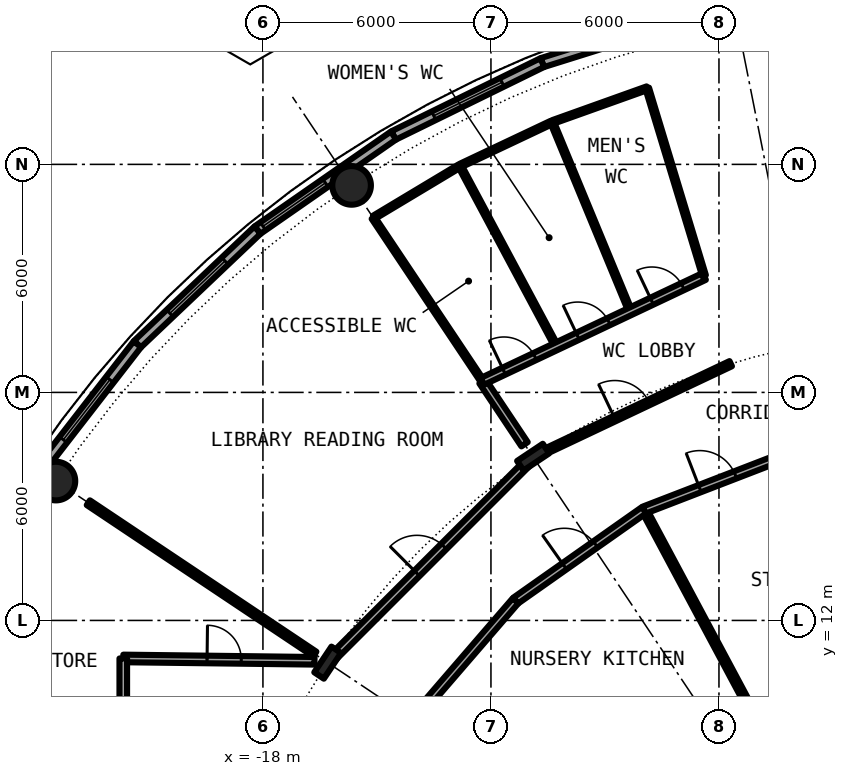
"""IFC4 building model, lengths in metres.
Left out: names, types, materials, properties, quantities, classifications, styles, units other than length and angle.
Written with IfcOpenShell. Run it as: python <this file> out.ifc"""

import sys

from ifc_helpers import new_model, si_unit, direction, frame, frame_2d, origin, origin_2d, place, context, subcontext, project, spatial, rectangle, hollow_circle, i_section, extrude, element, fill, save


model = new_model("IFC4")
c1 = context("Model", 3, precision=1e-05, world=origin(), true_north=direction((0.0, 1.0)))
c2 = subcontext(c1, "Body", "Model", "MODEL_VIEW")
j1 = project(units=[si_unit("LENGTHUNIT", "METRE"), si_unit("PLANEANGLEUNIT", "RADIAN")], contexts=[c1])
p1 = place(None, origin())
s1 = spatial("IfcSite", under=j1, at=p1, CompositionType="ELEMENT")
p2 = place(p1, origin())
s2 = spatial("IfcBuilding", under=s1, at=p2, CompositionType="ELEMENT")
p3 = place(p2, frame((0.0, 0.0, 14.1)))
s3 = spatial("IfcBuildingStorey", under=s2, at=p3, CompositionType="ELEMENT", Elevation=14.1)
for number, where, z_axis, x_axis in (
    (1, (-15.667, 23.448, 0.0), (0.0, 0.0, 1.0), (1.0, 0.0, 0.0)),
    (2, (-23.448, 15.667, 0.0), (0.0, 0.0, 1.0), (1.0, 0.0, 0.0)),
):
    element("IfcColumn", number, at=place(p3, frame(where, z_axis=z_axis, x_axis=x_axis)), inside=s3, PredefinedType="COLUMN", context=c2, shape_type="SweptSolid", body=[
        extrude(hollow_circle(Radius=0.508, WallThickness=0.05, at=origin_2d()), origin(), (0.0, 0.0, 1.0), 4.2),
    ])
for number, where, z_axis, x_axis in (
    (3, (-10.889, 16.297, 0.0), (0.0, 0.0, 1.0), (-0.556, 0.831, 0.0)),
    (4, (-16.297, 10.889, 0.0), (0.0, 0.0, 1.0), (-0.831, 0.556, 0.0)),
):
    element("IfcColumn", number, at=place(p3, frame(where, z_axis=z_axis, x_axis=x_axis)), inside=s3, PredefinedType="COLUMN", context=c2, shape_type="SweptSolid", body=[
        extrude(i_section(OverallWidth=0.303, OverallDepth=0.814, WebThickness=0.021, FlangeThickness=0.04, FilletRadius=0.03, at=origin_2d()), origin(), (0.0, 0.0, 1.0), 4.2),
    ])
p4 = place(p3, frame((-6.489, 27.982, 0.0), z_axis=(0.0, 0.0, 1.0), x_axis=(-0.954219534331, -0.299107138498, 0.0)))
e5 = element("IfcWall", 5, at=p4, inside=s3, PredefinedType="SOLIDWALL", context=c2, shape_type="SweptSolid", body=[
    extrude(rectangle(XDim=4.359, YDim=0.25, at=frame_2d((2.18, 0.0))), origin(), (0.0, 0.0, 1.0), 3.8),
])
p5 = place(p4, frame((1.18, 0.0, 0.9)))
e6 = element("IfcOpeningElement", 6, at=p5, cuts=e5, PredefinedType="OPENING", context=c2, shape_type="SweptSolid", body=[
    extrude(rectangle(XDim=2.0, YDim=2.4, at=frame_2d((1.0, 1.2))), frame((0.0, 0.135, 0.0), z_axis=(0.0, -1.0, 0.0), x_axis=(1.0, 0.0, 0.0)), (0.0, 0.0, 1.0), 0.27),
])
p6 = place(p3, frame((-10.649, 26.678, 0.0), z_axis=(0.0, 0.0, 1.0), x_axis=(-0.897938079481, -0.440121807478, 0.0)))
e7 = element("IfcWall", 7, at=p6, inside=s3, PredefinedType="SOLIDWALL", context=c2, shape_type="SweptSolid", body=[
    extrude(rectangle(XDim=4.36, YDim=0.25, at=frame_2d((2.18, 0.0))), origin(), (0.0, 0.0, 1.0), 3.8),
])
p7 = place(p6, frame((1.18, 0.0, 0.9)))
e8 = element("IfcOpeningElement", 8, at=p7, cuts=e7, PredefinedType="OPENING", context=c2, shape_type="SweptSolid", body=[
    extrude(rectangle(XDim=2.0, YDim=2.4, at=frame_2d((1.0, 1.2))), frame((0.0, 0.135, 0.0), z_axis=(0.0, -1.0, 0.0), x_axis=(1.0, 0.0, 0.0)), (0.0, 0.0, 1.0), 0.27),
])
p8 = place(p3, frame((-14.564, 24.759, 0.0), z_axis=(0.0, 0.0, 1.0), x_axis=(-0.820990800869, -0.57094141984, 0.0)))
e9 = element("IfcWall", 9, at=p8, inside=s3, PredefinedType="SOLIDWALL", context=c2, shape_type="SweptSolid", body=[
    extrude(rectangle(XDim=4.359, YDim=0.25, at=frame_2d((2.18, 0.0))), origin(), (0.0, 0.0, 1.0), 3.8),
])
p9 = place(p8, frame((2.183, 0.0, 0.9)))
e10 = element("IfcOpeningElement", 10, at=p9, cuts=e9, PredefinedType="OPENING", context=c2, shape_type="SweptSolid", body=[
    extrude(rectangle(XDim=2.0, YDim=2.4, at=frame_2d((1.0, 1.2))), frame((0.0, 0.135, 0.0), z_axis=(0.0, -1.0, 0.0), x_axis=(1.0, 0.0, 0.0)), (0.0, 0.0, 1.0), 0.27),
])
p10 = place(p3, frame((-18.143, 22.27, 0.0), z_axis=(0.0, 0.0, 1.0), x_axis=(-0.725101501119, -0.68864200647, 0.0)))
e11 = element("IfcWall", 11, at=p10, inside=s3, PredefinedType="SOLIDWALL", context=c2, shape_type="SweptSolid", body=[
    extrude(rectangle(XDim=4.359, YDim=0.25, at=frame_2d((2.18, 0.0))), origin(), (0.0, 0.0, 1.0), 3.8),
])
p11 = place(p10, frame((1.18, 0.0, 0.9)))
e12 = element("IfcOpeningElement", 12, at=p11, cuts=e11, PredefinedType="OPENING", context=c2, shape_type="SweptSolid", body=[
    extrude(rectangle(XDim=2.0, YDim=2.4, at=frame_2d((1.0, 1.2))), frame((0.0, 0.135, 0.0), z_axis=(0.0, -1.0, 0.0), x_axis=(1.0, 0.0, 0.0)), (0.0, 0.0, 1.0), 0.27),
])
p12 = place(p3, frame((-21.304, 19.268, 0.0), z_axis=(0.0, 0.0, 1.0), x_axis=(-0.612637256412, -0.790364214812, 0.0)))
e13 = element("IfcWall", 13, at=p12, inside=s3, PredefinedType="SOLIDWALL", context=c2, shape_type="SweptSolid", body=[
    extrude(rectangle(XDim=4.36, YDim=0.25, at=frame_2d((2.18, 0.0))), origin(), (0.0, 0.0, 1.0), 3.8),
])
p13 = place(p12, frame((1.18, 0.0, 0.9)))
e14 = element("IfcOpeningElement", 14, at=p13, cuts=e13, PredefinedType="OPENING", context=c2, shape_type="SweptSolid", body=[
    extrude(rectangle(XDim=2.0, YDim=2.4, at=frame_2d((1.0, 1.2))), frame((0.0, 0.135, 0.0), z_axis=(0.0, -1.0, 0.0), x_axis=(1.0, 0.0, 0.0)), (0.0, 0.0, 1.0), 0.27),
])
p14 = place(p3, frame((-22.595, 15.098, 0.0), z_axis=(0.0, 0.0, 1.0), x_axis=(0.831431488123, -0.555627285648, 0.0)))
e15 = element("IfcWall", 15, at=p14, inside=s3, PredefinedType="PARTITIONING", context=c2, shape_type="SweptSolid", body=[
    extrude(rectangle(XDim=7.168, YDim=0.15, at=frame_2d((3.584, 0.0))), origin(), (0.0, 0.0, 1.0), 3.8),
])
p15 = place(p3, frame((-15.098, 22.595, 0.0), z_axis=(0.0, 0.0, 1.0), x_axis=(0.555549082229, -0.83148374442, 0.0)))
e16 = element("IfcWall", 16, at=p15, inside=s3, PredefinedType="PARTITIONING", context=c2, shape_type="SweptSolid", body=[
    extrude(rectangle(XDim=5.175, YDim=0.1, at=frame_2d((2.587, 0.0))), origin(), (0.0, 0.0, 1.0), 3.8),
])
p16 = place(p3, frame((-12.819, 23.962, 0.0), z_axis=(0.0, 0.0, 1.0), x_axis=(0.471698142177, -0.881760093601, 0.0)))
e17 = element("IfcWall", 17, at=p16, inside=s3, PredefinedType="PARTITIONING", context=c2, shape_type="SweptSolid", body=[
    extrude(rectangle(XDim=5.387, YDim=0.1, at=frame_2d((2.693, 0.0))), origin(), (0.0, 0.0, 1.0), 3.8),
])
p17 = place(p3, frame((-12.222, 18.292, 0.0), z_axis=(0.0, 0.0, 1.0), x_axis=(0.555491592772, -0.831522152657, 0.0)))
e18 = element("IfcWall", 18, at=p17, inside=s3, PredefinedType="PARTITIONING", context=c2, shape_type="SweptSolid", body=[
    extrude(rectangle(XDim=1.993, YDim=0.2, at=frame_2d((0.996, 0.0))), origin(), (0.0, 0.0, 1.0), 3.8),
])
p18 = place(p3, frame((-10.391, 25.11, 0.0), z_axis=(0.0, 0.0, 1.0), x_axis=(0.38229040446, -0.924042232075, 0.0)))
e19 = element("IfcWall", 19, at=p18, inside=s3, PredefinedType="PARTITIONING", context=c2, shape_type="SweptSolid", body=[
    extrude(rectangle(XDim=5.386, YDim=0.1, at=frame_2d((2.693, 0.0))), origin(), (0.0, 0.0, 1.0), 3.8),
])
p19 = place(p3, frame((-7.968, 14.904, 0.0), z_axis=(0.0, 0.0, 1.0), x_axis=(0.471460365694, -0.881887251059, 0.0)))
e20 = element("IfcWall", 20, at=p19, inside=s3, PredefinedType="PARTITIONING", context=c2, shape_type="SweptSolid", body=[
    extrude(rectangle(XDim=9.18, YDim=0.15, at=frame_2d((4.59, 0.0))), origin(), (0.0, 0.0, 1.0), 3.8),
])
p20 = place(p3, frame((-21.675, 11.0, 0.0), z_axis=(0.0, 0.0, 1.0), x_axis=(0.999924074118, -0.012322580895, 0.0)))
e21 = element("IfcWall", 21, at=p20, inside=s3, PredefinedType="PARTITIONING", context=c2, shape_type="SweptSolid", body=[
    extrude(rectangle(XDim=5.032, YDim=0.2, at=frame_2d((2.516, 0.0))), origin(), (0.0, 0.0, 1.0), 3.8),
])
p21 = place(p20, frame((2.205, 0.0, 0.0)))
e22 = element("IfcOpeningElement", 22, at=p21, cuts=e21, PredefinedType="OPENING", context=c2, shape_type="SweptSolid", body=[
    extrude(rectangle(XDim=0.9, YDim=2.3, at=frame_2d((0.45, 1.15))), frame((0.0, 0.11, 0.0), z_axis=(0.0, -1.0, 0.0), x_axis=(1.0, 0.0, 0.0)), (0.0, 0.0, 1.0), 0.22),
])
p22 = place(p3, frame((-14.043, 9.4, 0.0), z_axis=(0.0, 0.0, 1.0), x_axis=(0.653274518104, 0.757121129012, 0.0)))
e23 = element("IfcWall", 23, at=p22, inside=s3, PredefinedType="PARTITIONING", context=c2, shape_type="SweptSolid", body=[
    extrude(rectangle(XDim=4.124, YDim=0.2, at=frame_2d((2.062, 0.0))), origin(), (0.0, 0.0, 1.0), 3.8),
])
p23 = place(p3, frame((-11.349, 12.522, 0.0), z_axis=(0.0, 0.0, 1.0), x_axis=(0.817567680547, 0.575832517079, 0.0)))
e24 = element("IfcWall", 24, at=p23, inside=s3, PredefinedType="PARTITIONING", context=c2, shape_type="SweptSolid", body=[
    extrude(rectangle(XDim=4.137, YDim=0.2, at=frame_2d((2.068, 0.0))), origin(), (0.0, 0.0, 1.0), 3.8),
])
p24 = place(p23, frame((1.568, 0.0, 0.0)))
e25 = element("IfcOpeningElement", 25, at=p24, cuts=e24, PredefinedType="OPENING", context=c2, shape_type="SweptSolid", body=[
    extrude(rectangle(XDim=1.0, YDim=2.3, at=frame_2d((0.5, 1.15))), frame((0.0, 0.11, 0.0), z_axis=(0.0, -1.0, 0.0), x_axis=(1.0, 0.0, 0.0)), (0.0, 0.0, 1.0), 0.22),
])
p25 = place(p3, frame((-7.967, 14.904, 0.0), z_axis=(0.0, 0.0, 1.0), x_axis=(0.932943640288, 0.360022449363, 0.0)))
e26 = element("IfcWall", 26, at=p25, inside=s3, PredefinedType="PARTITIONING", context=c2, shape_type="SweptSolid", body=[
    extrude(rectangle(XDim=4.139, YDim=0.2, at=frame_2d((2.069, 0.0))), origin(), (0.0, 0.0, 1.0), 3.8),
])
p26 = place(p25, frame((1.569, 0.0, 0.0)))
e27 = element("IfcOpeningElement", 27, at=p26, cuts=e26, PredefinedType="OPENING", context=c2, shape_type="SweptSolid", body=[
    extrude(rectangle(XDim=1.0, YDim=2.3, at=frame_2d((0.5, 1.15))), frame((0.0, 0.11, 0.0), z_axis=(0.0, -1.0, 0.0), x_axis=(1.0, 0.0, 0.0)), (0.0, 0.0, 1.0), 0.22),
])
p27 = place(p3, frame((-16.188, 10.998, 0.0), z_axis=(0.0, 0.0, 1.0), x_axis=(0.707106781187, 0.707106781187, 0.0)))
e28 = element("IfcWall", 28, at=p27, inside=s3, PredefinedType="PARTITIONING", context=c2, shape_type="SweptSolid", body=[
    extrude(rectangle(XDim=7.34, YDim=0.2, at=frame_2d((3.67, 0.0))), origin(), (0.0, 0.0, 1.0), 3.38),
])
p28 = place(p27, frame((3.17, 0.0, 0.0)))
e29 = element("IfcOpeningElement", 29, at=p28, cuts=e28, PredefinedType="OPENING", context=c2, shape_type="SweptSolid", body=[
    extrude(rectangle(XDim=1.0, YDim=2.3, at=frame_2d((0.5, 1.15))), frame((0.0, 0.11, 0.0), z_axis=(0.0, -1.0, 0.0), x_axis=(1.0, 0.0, 0.0)), (0.0, 0.0, 1.0), 0.22),
])
p29 = place(p3, frame((-10.751, 16.362, 0.0), z_axis=(0.0, 0.0, 1.0), x_axis=(0.903965018344, 0.42760641437, 0.0)))
e30 = element("IfcWall", 30, at=p29, inside=s3, PredefinedType="PARTITIONING", context=c2, shape_type="SweptSolid", body=[
    extrude(rectangle(XDim=5.599, YDim=0.15, at=frame_2d((2.799, 0.0))), origin(), (0.0, 0.0, 1.0), 3.38),
])
p30 = place(p29, frame((2.223, 0.0, 0.0)))
e31 = element("IfcOpeningElement", 31, at=p30, cuts=e30, PredefinedType="OPENING", context=c2, shape_type="SweptSolid", body=[
    extrude(rectangle(XDim=1.0, YDim=2.3, at=frame_2d((0.5, 1.15))), frame((0.0, 0.085, 0.0), z_axis=(0.0, -1.0, 0.0), x_axis=(1.0, 0.0, 0.0)), (0.0, 0.0, 1.0), 0.17),
])
p31 = place(p3, frame((-21.675, 9.4, 0.0), z_axis=(0.0, 0.0, 1.0), x_axis=(0.0, 1.0, 0.0)))
e32 = element("IfcWall", 32, at=p31, inside=s3, PredefinedType="PARTITIONING", context=c2, shape_type="SweptSolid", body=[
    extrude(rectangle(XDim=1.6, YDim=0.2, at=frame_2d((0.8, 0.0))), origin(), (0.0, 0.0, 1.0), 3.8),
])
p32 = place(p3, frame((-12.226, 18.29, 0.0), z_axis=(0.0, 0.0, 1.0), x_axis=(0.90397320193, 0.427589113745, 0.0)))
e33 = element("IfcWall", 33, at=p32, inside=s3, PredefinedType="PARTITIONING", context=c2, shape_type="SweptSolid", body=[
    extrude(rectangle(XDim=6.459, YDim=0.2, at=frame_2d((3.23, 0.0))), origin(), (0.0, 0.0, 1.0), 3.8),
])
p33 = place(p32, frame((4.934, 0.0, 0.0)))
e34 = element("IfcOpeningElement", 34, at=p33, cuts=e33, PredefinedType="OPENING", context=c2, shape_type="SweptSolid", body=[
    extrude(rectangle(XDim=0.9, YDim=2.3, at=frame_2d((0.45, 1.15))), frame((0.0, 0.11, 0.0), z_axis=(0.0, -1.0, 0.0), x_axis=(1.0, 0.0, 0.0)), (0.0, 0.0, 1.0), 0.22),
])
p34 = place(p32, frame((2.777, 0.0, 0.0)))
e35 = element("IfcOpeningElement", 35, at=p34, cuts=e33, PredefinedType="OPENING", context=c2, shape_type="SweptSolid", body=[
    extrude(rectangle(XDim=0.9, YDim=2.3, at=frame_2d((0.45, 1.15))), frame((0.0, 0.11, 0.0), z_axis=(0.0, -1.0, 0.0), x_axis=(1.0, 0.0, 0.0)), (0.0, 0.0, 1.0), 0.22),
])
p35 = place(p32, frame((0.628, 0.0, 0.0)))
e36 = element("IfcOpeningElement", 36, at=p35, cuts=e33, PredefinedType="OPENING", context=c2, shape_type="SweptSolid", body=[
    extrude(rectangle(XDim=0.9, YDim=2.3, at=frame_2d((0.45, 1.15))), frame((0.0, 0.11, 0.0), z_axis=(0.0, -1.0, 0.0), x_axis=(1.0, 0.0, 0.0)), (0.0, 0.0, 1.0), 0.22),
])
p36 = place(p3, frame((-10.372, 25.117, 0.0), z_axis=(0.0, 0.0, 1.0), x_axis=(0.941651844769, 0.336588477585, 0.0)))
e37 = element("IfcWall", 37, at=p36, inside=s3, PredefinedType="PARTITIONING", context=c2, shape_type="SweptSolid", body=[
    extrude(rectangle(XDim=2.638, YDim=0.1, at=frame_2d((1.319, 0.0))), origin(), (0.0, 0.0, 1.0), 3.8),
])
p37 = place(p3, frame((-7.888, 26.005, 0.0), z_axis=(0.0, 0.0, 1.0), x_axis=(0.290192738678, -0.956968220172, 0.0)))
e38 = element("IfcWall", 38, at=p37, inside=s3, PredefinedType="PARTITIONING", context=c2, shape_type="SweptSolid", body=[
    extrude(rectangle(XDim=5.155, YDim=0.1, at=frame_2d((2.577, 0.0))), origin(), (0.0, 0.0, 1.0), 3.8),
])
p38 = place(p3, frame((-12.8, 23.971, 0.0), z_axis=(0.0, 0.0, 1.0), x_axis=(0.904104040696, 0.427312395792, 0.0)))
e39 = element("IfcWall", 39, at=p38, inside=s3, PredefinedType="PARTITIONING", context=c2, shape_type="SweptSolid", body=[
    extrude(rectangle(XDim=2.645, YDim=0.1, at=frame_2d((1.322, 0.0))), origin(), (0.0, 0.0, 1.0), 3.8),
])
p39 = place(p3, frame((-15.081, 22.605, 0.0), z_axis=(0.0, 0.0, 1.0), x_axis=(0.857616279358, 0.514290110132, 0.0)))
e40 = element("IfcWall", 40, at=p39, inside=s3, PredefinedType="PARTITIONING", context=c2, shape_type="SweptSolid", body=[
    extrude(rectangle(XDim=2.619, YDim=0.1, at=frame_2d((1.31, 0.0))), origin(), (0.0, 0.0, 1.0), 3.8),
])
p40 = place(p7, origin())
e41 = element("IfcWindow", 41, at=p40, inside=s3, PartitioningType="SINGLE_PANEL", PredefinedType="WINDOW", context=c2, shape_type="SweptSolid", body=[
    extrude(rectangle(XDim=2.0, YDim=2.4, at=frame_2d((1.0, 1.2))), frame((0.0, 0.03, 0.0), z_axis=(0.0, -1.0, 0.0), x_axis=(1.0, 0.0, 0.0)), (0.0, 0.0, 1.0), 0.06),
])
fill(e8, e41)
p41 = place(p9, origin())
e42 = element("IfcWindow", 42, at=p41, inside=s3, PartitioningType="SINGLE_PANEL", PredefinedType="WINDOW", context=c2, shape_type="SweptSolid", body=[
    extrude(rectangle(XDim=2.0, YDim=2.4, at=frame_2d((1.0, 1.2))), frame((0.0, 0.03, 0.0), z_axis=(0.0, -1.0, 0.0), x_axis=(1.0, 0.0, 0.0)), (0.0, 0.0, 1.0), 0.06),
])
fill(e10, e42)
p42 = place(p11, origin())
e43 = element("IfcWindow", 43, at=p42, inside=s3, PartitioningType="SINGLE_PANEL", PredefinedType="WINDOW", context=c2, shape_type="SweptSolid", body=[
    extrude(rectangle(XDim=2.0, YDim=2.4, at=frame_2d((1.0, 1.2))), frame((0.0, 0.03, 0.0), z_axis=(0.0, -1.0, 0.0), x_axis=(1.0, 0.0, 0.0)), (0.0, 0.0, 1.0), 0.06),
])
fill(e12, e43)
p43 = place(p13, origin())
e44 = element("IfcWindow", 44, at=p43, inside=s3, PartitioningType="SINGLE_PANEL", PredefinedType="WINDOW", context=c2, shape_type="SweptSolid", body=[
    extrude(rectangle(XDim=2.0, YDim=2.4, at=frame_2d((1.0, 1.2))), frame((0.0, 0.03, 0.0), z_axis=(0.0, -1.0, 0.0), x_axis=(1.0, 0.0, 0.0)), (0.0, 0.0, 1.0), 0.06),
])
fill(e14, e44)
p44 = place(p30, origin())
e45 = element("IfcDoor", 45, at=p44, inside=s3, OperationType="SINGLE_SWING_LEFT", PredefinedType="DOOR", context=c2, shape_type="SweptSolid", body=[
    extrude(rectangle(XDim=1.0, YDim=2.3, at=frame_2d((0.5, 1.15))), frame((0.0, 0.025, 0.0), z_axis=(0.0, -1.0, 0.0), x_axis=(1.0, 0.0, 0.0)), (0.0, 0.0, 1.0), 0.05),
])
fill(e31, e45)
p45 = place(p33, origin())
e46 = element("IfcDoor", 46, at=p45, inside=s3, OperationType="SINGLE_SWING_RIGHT", PredefinedType="DOOR", context=c2, shape_type="SweptSolid", body=[
    extrude(rectangle(XDim=0.9, YDim=2.3, at=frame_2d((0.45, 1.15))), frame((0.0, 0.025, 0.0), z_axis=(0.0, -1.0, 0.0), x_axis=(1.0, 0.0, 0.0)), (0.0, 0.0, 1.0), 0.05),
])
fill(e34, e46)
p46 = place(p34, origin())
e47 = element("IfcDoor", 47, at=p46, inside=s3, OperationType="SINGLE_SWING_LEFT", PredefinedType="DOOR", context=c2, shape_type="SweptSolid", body=[
    extrude(rectangle(XDim=0.9, YDim=2.3, at=frame_2d((0.45, 1.15))), frame((0.0, 0.025, 0.0), z_axis=(0.0, -1.0, 0.0), x_axis=(1.0, 0.0, 0.0)), (0.0, 0.0, 1.0), 0.05),
])
fill(e35, e47)
p47 = place(p35, origin())
e48 = element("IfcDoor", 48, at=p47, inside=s3, OperationType="SINGLE_SWING_LEFT", PredefinedType="DOOR", context=c2, shape_type="SweptSolid", body=[
    extrude(rectangle(XDim=0.9, YDim=2.3, at=frame_2d((0.45, 1.15))), frame((0.0, 0.025, 0.0), z_axis=(0.0, -1.0, 0.0), x_axis=(1.0, 0.0, 0.0)), (0.0, 0.0, 1.0), 0.05),
])
fill(e36, e48)
p48 = place(p28, origin())
e49 = element("IfcDoor", 49, at=p48, inside=s3, OperationType="SINGLE_SWING_RIGHT", PredefinedType="DOOR", context=c2, shape_type="SweptSolid", body=[
    extrude(rectangle(XDim=1.0, YDim=2.3, at=frame_2d((0.5, 1.15))), frame((0.0, 0.025, 0.0), z_axis=(0.0, -1.0, 0.0), x_axis=(1.0, 0.0, 0.0)), (0.0, 0.0, 1.0), 0.05),
])
fill(e29, e49)
p49 = place(p26, origin())
e50 = element("IfcDoor", 50, at=p49, inside=s3, OperationType="SINGLE_SWING_RIGHT", PredefinedType="DOOR", context=c2, shape_type="SweptSolid", body=[
    extrude(rectangle(XDim=1.0, YDim=2.3, at=frame_2d((0.5, 1.15))), frame((0.0, 0.025, 0.0), z_axis=(0.0, -1.0, 0.0), x_axis=(1.0, 0.0, 0.0)), (0.0, 0.0, 1.0), 0.05),
])
fill(e27, e50)
p50 = place(p24, origin())
e51 = element("IfcDoor", 51, at=p50, inside=s3, OperationType="SINGLE_SWING_RIGHT", PredefinedType="DOOR", context=c2, shape_type="SweptSolid", body=[
    extrude(rectangle(XDim=1.0, YDim=2.3, at=frame_2d((0.5, 1.15))), frame((0.0, 0.025, 0.0), z_axis=(0.0, -1.0, 0.0), x_axis=(1.0, 0.0, 0.0)), (0.0, 0.0, 1.0), 0.05),
])
fill(e25, e51)
p51 = place(p21, origin())
e52 = element("IfcDoor", 52, at=p51, inside=s3, OperationType="SINGLE_SWING_RIGHT", PredefinedType="DOOR", context=c2, shape_type="SweptSolid", body=[
    extrude(rectangle(XDim=0.9, YDim=2.3, at=frame_2d((0.45, 1.15))), frame((0.0, 0.025, 0.0), z_axis=(0.0, -1.0, 0.0), x_axis=(1.0, 0.0, 0.0)), (0.0, 0.0, 1.0), 0.05),
])
fill(e22, e52)
save(model, sys.argv[1])
